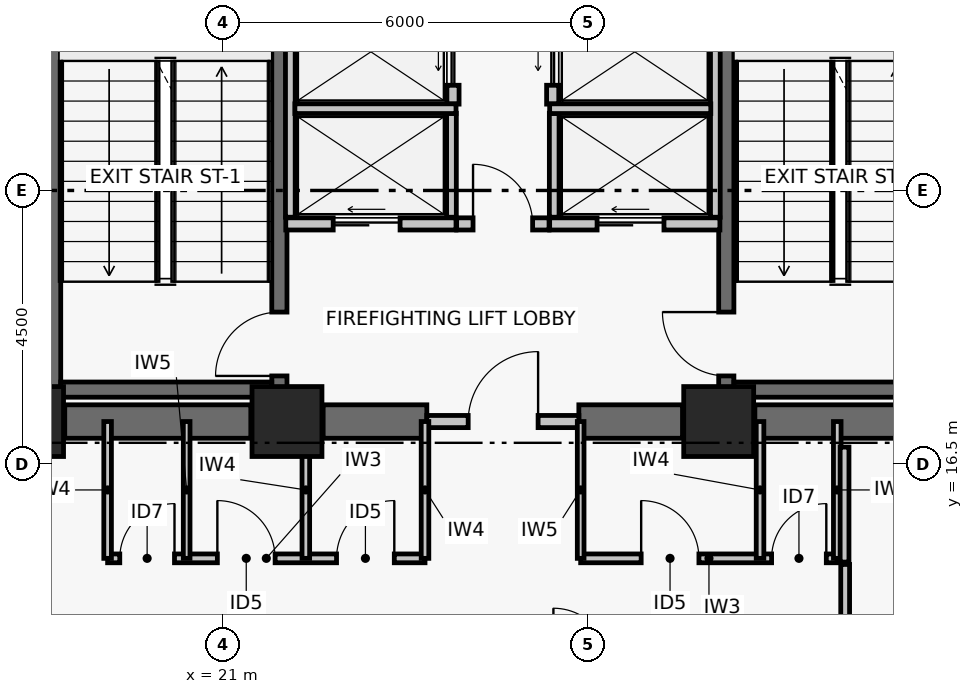
"""IFC4 building model, lengths in metres.
Left out: names, types, materials, properties, quantities, classifications, styles, units other than length and angle.
Written with IfcOpenShell. Run it as: python <this file> out.ifc"""

import sys

from ifc_helpers import new_model, si_unit, direction, frame, frame_2d, origin, origin_2d, place, context, subcontext, project, spatial, rectangle, extrude, element, fill, save


model = new_model("IFC4")
c1 = context("Model", 3, precision=1e-05, world=origin(), true_north=direction((0.0, 1.0)))
c2 = subcontext(c1, "Body", "Model", "MODEL_VIEW")
j1 = project(units=[si_unit("LENGTHUNIT", "METRE"), si_unit("PLANEANGLEUNIT", "RADIAN")], contexts=[c1])
p1 = place(None, origin())
s1 = spatial("IfcSite", under=j1, at=p1, CompositionType="ELEMENT")
p2 = place(p1, origin())
s2 = spatial("IfcBuilding", under=s1, at=p2, CompositionType="ELEMENT")
p3 = place(p2, frame((0.0, 0.0, 92.82)))
s3 = spatial("IfcBuildingStorey", under=s2, at=p3, CompositionType="ELEMENT", Elevation=92.82)
for number, where, z_axis, x_axis in (
    (1, (17.8, 17.2, 0.0), (0.0, 0.0, 1.0), (1.0, 0.0, 0.0)),
    (2, (22.05, 17.2, 0.0), (0.0, 0.0, 1.0), (1.0, 0.0, 0.0)),
    (3, (29.15, 17.2, 0.0), (0.0, 0.0, 1.0), (1.0, 0.0, 0.0)),
):
    element("IfcColumn", number, at=place(p3, frame(where, z_axis=z_axis, x_axis=x_axis)), inside=s3, PredefinedType="COLUMN", context=c2, shape_type="SweptSolid", body=[
        extrude(rectangle(XDim=1.15, YDim=1.15, at=origin_2d()), origin(), (0.0, 0.0, 1.0), 3.72),
    ])
p4 = place(p3, frame((18.395, 17.2, 0.0), z_axis=(0.0, 0.0, 1.0), x_axis=(1.0, 0.0, 0.0)))
e4 = element("IfcWall", 4, at=p4, inside=s3, PredefinedType="SHEAR", context=c2, shape_type="SweptSolid", body=[
    extrude(rectangle(XDim=3.06, YDim=0.55, at=frame_2d((1.53, 0.0))), origin(), (0.0, 0.0, 1.0), 3.47),
])
p5 = place(p3, frame((22.645, 17.2, 0.0), z_axis=(0.0, 0.0, 1.0), x_axis=(1.0, 0.0, 0.0)))
e5 = element("IfcWall", 5, at=p5, inside=s3, PredefinedType="SHEAR", context=c2, shape_type="SweptSolid", body=[
    extrude(rectangle(XDim=1.705, YDim=0.55, at=frame_2d((0.853, 0.0))), origin(), (0.0, 0.0, 1.0), 3.47),
])
p6 = place(p3, frame((26.85, 17.2, 0.0), z_axis=(0.0, 0.0, 1.0), x_axis=(1.0, 0.0, 0.0)))
e6 = element("IfcWall", 6, at=p6, inside=s3, PredefinedType="SHEAR", context=c2, shape_type="SweptSolid", body=[
    extrude(rectangle(XDim=1.705, YDim=0.55, at=frame_2d((0.853, 0.0))), origin(), (0.0, 0.0, 1.0), 3.47),
])
p7 = place(p3, frame((29.745, 17.2, 0.0), z_axis=(0.0, 0.0, 1.0), x_axis=(1.0, 0.0, 0.0)))
e7 = element("IfcWall", 7, at=p7, inside=s3, PredefinedType="SHEAR", context=c2, shape_type="SweptSolid", body=[
    extrude(rectangle(XDim=3.06, YDim=0.55, at=frame_2d((1.53, 0.0))), origin(), (0.0, 0.0, 1.0), 3.47),
])
p8 = place(p3, frame((18.204, 17.6, 0.0), z_axis=(0.0, 0.0, 1.0), x_axis=(0.0, 1.0, 0.0)))
e8 = element("IfcWall", 8, at=p8, inside=s3, PredefinedType="SHEAR", context=c2, shape_type="SweptSolid", body=[
    extrude(rectangle(XDim=8.8, YDim=0.25, at=frame_2d((4.4, 0.0))), origin(), (0.0, 0.0, 1.0), 3.47),
])
p9 = place(p3, frame((21.925, 17.6, 0.0), z_axis=(0.0, 0.0, 1.0), x_axis=(0.0, 1.0, 0.0)))
e9 = element("IfcWall", 9, at=p9, inside=s3, PredefinedType="SHEAR", context=c2, shape_type="SweptSolid", body=[
    extrude(rectangle(XDim=8.8, YDim=0.25, at=frame_2d((4.4, 0.0))), origin(), (0.0, 0.0, 1.0), 3.47),
])
p10 = place(p9, frame((0.35, 0.0, 0.0)))
e10 = element("IfcOpeningElement", 10, at=p10, cuts=e9, PredefinedType="OPENING", context=c2, shape_type="SweptSolid", body=[
    extrude(rectangle(XDim=1.05, YDim=2.08, at=frame_2d((0.525, 1.04))), frame((0.0, 0.135, 0.0), z_axis=(0.0, -1.0, 0.0), x_axis=(1.0, 0.0, 0.0)), (0.0, 0.0, 1.0), 0.27),
])
p11 = place(p3, frame((18.329, 17.725, 0.0), z_axis=(0.0, 0.0, 1.0), x_axis=(1.0, 0.0, 0.0)))
e11 = element("IfcWall", 11, at=p11, inside=s3, PredefinedType="SHEAR", context=c2, shape_type="SweptSolid", body=[
    extrude(rectangle(XDim=3.471, YDim=0.25, at=frame_2d((1.735, 0.0))), origin(), (0.0, 0.0, 1.0), 3.47),
])
p12 = place(p3, frame((29.275, 17.6, 0.0), z_axis=(0.0, 0.0, 1.0), x_axis=(0.0, 1.0, 0.0)))
e12 = element("IfcWall", 12, at=p12, inside=s3, PredefinedType="SHEAR", context=c2, shape_type="SweptSolid", body=[
    extrude(rectangle(XDim=8.8, YDim=0.25, at=frame_2d((4.4, 0.0))), origin(), (0.0, 0.0, 1.0), 3.47),
])
p13 = place(p12, frame((0.35, 0.0, 0.0)))
e13 = element("IfcOpeningElement", 13, at=p13, cuts=e12, PredefinedType="OPENING", context=c2, shape_type="SweptSolid", body=[
    extrude(rectangle(XDim=1.05, YDim=2.08, at=frame_2d((0.525, 1.04))), frame((0.0, 0.135, 0.0), z_axis=(0.0, -1.0, 0.0), x_axis=(1.0, 0.0, 0.0)), (0.0, 0.0, 1.0), 0.27),
])
p14 = place(p3, frame((29.4, 17.725, 0.0), z_axis=(0.0, 0.0, 1.0), x_axis=(1.0, 0.0, 0.0)))
e14 = element("IfcWall", 14, at=p14, inside=s3, PredefinedType="SHEAR", context=c2, shape_type="SweptSolid", body=[
    extrude(rectangle(XDim=3.471, YDim=0.25, at=frame_2d((1.736, 0.0))), origin(), (0.0, 0.0, 1.0), 3.47),
])
p15 = place(p3, frame((24.35, 17.2, 0.0), z_axis=(0.0, 0.0, 1.0), x_axis=(1.0, 0.0, 0.0)))
e15 = element("IfcWall", 15, at=p15, inside=s3, PredefinedType="PARTITIONING", context=c2, shape_type="SweptSolid", body=[
    extrude(rectangle(XDim=2.5, YDim=0.2, at=frame_2d((1.25, 0.0))), origin(), (0.0, 0.0, 1.0), 2.6),
])
p16 = place(p15, frame((0.68, 0.0, 0.0)))
e16 = element("IfcOpeningElement", 16, at=p16, cuts=e15, PredefinedType="OPENING", context=c2, shape_type="SweptSolid", body=[
    extrude(rectangle(XDim=1.15, YDim=2.08, at=frame_2d((0.575, 1.04))), frame((0.0, 0.11, 0.0), z_axis=(0.0, -1.0, 0.0), x_axis=(1.0, 0.0, 0.0)), (0.0, 0.0, 1.0), 0.22),
])
p17 = place(p3, frame((24.84, 20.45, 0.0), z_axis=(0.0, 0.0, 1.0), x_axis=(1.0, 0.0, 0.0)))
e17 = element("IfcWall", 17, at=p17, inside=s3, PredefinedType="PARTITIONING", context=c2, shape_type="SweptSolid", body=[
    extrude(rectangle(XDim=1.52, YDim=0.2, at=frame_2d((0.76, 0.0))), origin(), (0.0, 0.0, 1.0), 3.47),
])
p18 = place(p17, frame((0.27, 0.0, 0.0)))
e18 = element("IfcOpeningElement", 18, at=p18, cuts=e17, PredefinedType="OPENING", context=c2, shape_type="SweptSolid", body=[
    extrude(rectangle(XDim=0.98, YDim=2.06, at=frame_2d((0.49, 1.03))), frame((0.0, 0.11, 0.0), z_axis=(0.0, -1.0, 0.0), x_axis=(1.0, 0.0, 0.0)), (0.0, 0.0, 1.0), 0.22),
])
p19 = place(p3, frame((22.03, 20.45, 0.0), z_axis=(0.0, 0.0, 1.0), x_axis=(1.0, 0.0, 0.0)))
e19 = element("IfcWall", 19, at=p19, inside=s3, PredefinedType="PARTITIONING", context=c2, shape_type="SweptSolid", body=[
    extrude(rectangle(XDim=2.8, YDim=0.2, at=frame_2d((1.4, 0.0))), origin(), (0.0, 0.0, 1.0), 3.47),
])
p20 = place(p19, frame((0.78, 0.0, 0.0)))
e20 = element("IfcOpeningElement", 20, at=p20, cuts=e19, PredefinedType="OPENING", context=c2, shape_type="SweptSolid", body=[
    extrude(rectangle(XDim=1.1, YDim=2.08, at=frame_2d((0.55, 1.04))), frame((0.0, 0.11, 0.0), z_axis=(0.0, -1.0, 0.0), x_axis=(1.0, 0.0, 0.0)), (0.0, 0.0, 1.0), 0.22),
])
p21 = place(p3, frame((26.37, 20.45, 0.0), z_axis=(0.0, 0.0, 1.0), x_axis=(1.0, 0.0, 0.0)))
e21 = element("IfcWall", 21, at=p21, inside=s3, PredefinedType="PARTITIONING", context=c2, shape_type="SweptSolid", body=[
    extrude(rectangle(XDim=2.8, YDim=0.2, at=frame_2d((1.4, 0.0))), origin(), (0.0, 0.0, 1.0), 3.47),
])
p22 = place(p21, frame((0.78, 0.0, 0.0)))
e22 = element("IfcOpeningElement", 22, at=p22, cuts=e21, PredefinedType="OPENING", context=c2, shape_type="SweptSolid", body=[
    extrude(rectangle(XDim=1.1, YDim=2.08, at=frame_2d((0.55, 1.04))), frame((0.0, 0.11, 0.0), z_axis=(0.0, -1.0, 0.0), x_axis=(1.0, 0.0, 0.0)), (0.0, 0.0, 1.0), 0.22),
])
p23 = place(p3, frame((24.78, 22.42, 0.0), z_axis=(0.0, 0.0, 1.0), x_axis=(0.0, 1.0, 0.0)))
e23 = element("IfcWall", 23, at=p23, inside=s3, PredefinedType="PARTITIONING", context=c2, shape_type="SweptSolid", body=[
    extrude(rectangle(XDim=1.72, YDim=0.2, at=frame_2d((0.86, 0.0))), origin(), (0.0, 0.0, 1.0), 3.47),
])
p24 = place(p23, frame((0.31, 0.0, 0.0)))
e24 = element("IfcOpeningElement", 24, at=p24, cuts=e23, PredefinedType="OPENING", context=c2, shape_type="SweptSolid", body=[
    extrude(rectangle(XDim=1.1, YDim=2.08, at=frame_2d((0.55, 1.04))), frame((0.0, 0.11, 0.0), z_axis=(0.0, -1.0, 0.0), x_axis=(1.0, 0.0, 0.0)), (0.0, 0.0, 1.0), 0.22),
])
p25 = place(p3, frame((26.42, 22.42, 0.0), z_axis=(0.0, 0.0, 1.0), x_axis=(0.0, 1.0, 0.0)))
e25 = element("IfcWall", 25, at=p25, inside=s3, PredefinedType="PARTITIONING", context=c2, shape_type="SweptSolid", body=[
    extrude(rectangle(XDim=1.72, YDim=0.2, at=frame_2d((0.86, 0.0))), origin(), (0.0, 0.0, 1.0), 3.47),
])
p26 = place(p25, frame((0.31, 0.0, 0.0)))
e26 = element("IfcOpeningElement", 26, at=p26, cuts=e25, PredefinedType="OPENING", context=c2, shape_type="SweptSolid", body=[
    extrude(rectangle(XDim=1.1, YDim=2.08, at=frame_2d((0.55, 1.04))), frame((0.0, 0.11, 0.0), z_axis=(0.0, -1.0, 0.0), x_axis=(1.0, 0.0, 0.0)), (0.0, 0.0, 1.0), 0.22),
])
p27 = place(p3, frame((22.105, 20.56, 0.0), z_axis=(0.0, 0.0, 1.0), x_axis=(0.0, 1.0, 0.0)))
e27 = element("IfcWall", 27, at=p27, inside=s3, PredefinedType="PARTITIONING", context=c2, shape_type="SweptSolid", body=[
    extrude(rectangle(XDim=5.45, YDim=0.16, at=frame_2d((2.725, 0.0))), origin(), (0.0, 0.0, 1.0), 3.47),
])
p28 = place(p3, frame((24.755, 20.56, 0.0), z_axis=(0.0, 0.0, 1.0), x_axis=(0.0, 1.0, 0.0)))
e28 = element("IfcWall", 28, at=p28, inside=s3, PredefinedType="PARTITIONING", context=c2, shape_type="SweptSolid", body=[
    extrude(rectangle(XDim=1.71, YDim=0.16, at=frame_2d((0.855, 0.0))), origin(), (0.0, 0.0, 1.0), 3.47),
])
p29 = place(p3, frame((22.18, 22.345, 0.0), z_axis=(0.0, 0.0, 1.0), x_axis=(1.0, 0.0, 0.0)))
e29 = element("IfcWall", 29, at=p29, inside=s3, PredefinedType="PARTITIONING", context=c2, shape_type="SweptSolid", body=[
    extrude(rectangle(XDim=2.65, YDim=0.16, at=frame_2d((1.325, 0.0))), origin(), (0.0, 0.0, 1.0), 3.47),
])
p30 = place(p3, frame((29.095, 20.56, 0.0), z_axis=(0.0, 0.0, 1.0), x_axis=(0.0, 1.0, 0.0)))
e30 = element("IfcWall", 30, at=p30, inside=s3, PredefinedType="PARTITIONING", context=c2, shape_type="SweptSolid", body=[
    extrude(rectangle(XDim=5.45, YDim=0.16, at=frame_2d((2.725, 0.0))), origin(), (0.0, 0.0, 1.0), 3.47),
])
p31 = place(p3, frame((26.445, 20.56, 0.0), z_axis=(0.0, 0.0, 1.0), x_axis=(0.0, 1.0, 0.0)))
e31 = element("IfcWall", 31, at=p31, inside=s3, PredefinedType="PARTITIONING", context=c2, shape_type="SweptSolid", body=[
    extrude(rectangle(XDim=1.71, YDim=0.16, at=frame_2d((0.855, 0.0))), origin(), (0.0, 0.0, 1.0), 3.47),
])
p32 = place(p3, frame((26.37, 22.345, 0.0), z_axis=(0.0, 0.0, 1.0), x_axis=(1.0, 0.0, 0.0)))
e32 = element("IfcWall", 32, at=p32, inside=s3, PredefinedType="PARTITIONING", context=c2, shape_type="SweptSolid", body=[
    extrude(rectangle(XDim=2.65, YDim=0.16, at=frame_2d((1.325, 0.0))), origin(), (0.0, 0.0, 1.0), 3.47),
])
p33 = place(p3, frame((19.1, 14.95, 0.0), z_axis=(0.0, 0.0, 1.0), x_axis=(1.0, 0.0, 0.0)))
e33 = element("IfcWall", 33, at=p33, inside=s3, PredefinedType="PARTITIONING", context=c2, shape_type="SweptSolid", body=[
    extrude(rectangle(XDim=5.22, YDim=0.145, at=frame_2d((2.61, 0.0))), origin(), (0.0, 0.0, 1.0), 2.65),
])
p34 = place(p33, frame((0.2, 0.0, 0.0)))
e34 = element("IfcOpeningElement", 34, at=p34, cuts=e33, PredefinedType="OPENING", context=c2, shape_type="SweptSolid", body=[
    extrude(rectangle(XDim=0.9, YDim=2.02, at=frame_2d((0.45, 1.01))), frame((0.0, 0.083, 0.0), z_axis=(0.0, -1.0, 0.0), x_axis=(1.0, 0.0, 0.0)), (0.0, 0.0, 1.0), 0.165),
])
p35 = place(p33, frame((1.805, 0.0, 0.0)))
e35 = element("IfcOpeningElement", 35, at=p35, cuts=e33, PredefinedType="OPENING", context=c2, shape_type="SweptSolid", body=[
    extrude(rectangle(XDim=0.95, YDim=2.06, at=frame_2d((0.475, 1.03))), frame((0.0, 0.083, 0.0), z_axis=(0.0, -1.0, 0.0), x_axis=(1.0, 0.0, 0.0)), (0.0, 0.0, 1.0), 0.165),
])
p36 = place(p33, frame((3.765, 0.0, 0.0)))
e36 = element("IfcOpeningElement", 36, at=p36, cuts=e33, PredefinedType="OPENING", context=c2, shape_type="SweptSolid", body=[
    extrude(rectangle(XDim=0.95, YDim=2.06, at=frame_2d((0.475, 1.03))), frame((0.0, 0.083, 0.0), z_axis=(0.0, -1.0, 0.0), x_axis=(1.0, 0.0, 0.0)), (0.0, 0.0, 1.0), 0.165),
])
p37 = place(p3, frame((26.88, 14.95, 0.0), z_axis=(0.0, 0.0, 1.0), x_axis=(1.0, 0.0, 0.0)))
e37 = element("IfcWall", 37, at=p37, inside=s3, PredefinedType="PARTITIONING", context=c2, shape_type="SweptSolid", body=[
    extrude(rectangle(XDim=4.22, YDim=0.145, at=frame_2d((2.11, 0.0))), origin(), (0.0, 0.0, 1.0), 3.05),
])
p38 = place(p37, frame((0.995, 0.0, 0.0)))
e38 = element("IfcOpeningElement", 38, at=p38, cuts=e37, PredefinedType="OPENING", context=c2, shape_type="SweptSolid", body=[
    extrude(rectangle(XDim=0.95, YDim=2.06, at=frame_2d((0.475, 1.03))), frame((0.0, 0.083, 0.0), z_axis=(0.0, -1.0, 0.0), x_axis=(1.0, 0.0, 0.0)), (0.0, 0.0, 1.0), 0.165),
])
p39 = place(p37, frame((3.14, 0.0, 0.0)))
e39 = element("IfcOpeningElement", 39, at=p39, cuts=e37, PredefinedType="OPENING", context=c2, shape_type="SweptSolid", body=[
    extrude(rectangle(XDim=0.9, YDim=2.02, at=frame_2d((0.45, 1.01))), frame((0.0, 0.083, 0.0), z_axis=(0.0, -1.0, 0.0), x_axis=(1.0, 0.0, 0.0)), (0.0, 0.0, 1.0), 0.165),
])
p40 = place(p3, frame((19.1, 14.95, 0.0), z_axis=(0.0, 0.0, 1.0), x_axis=(0.0, 1.0, 0.0)))
e40 = element("IfcWall", 40, at=p40, inside=s3, PredefinedType="PARTITIONING", context=c2, shape_type="SweptSolid", body=[
    extrude(rectangle(XDim=2.25, YDim=0.125, at=frame_2d((1.125, 0.0))), origin(), (0.0, 0.0, 1.0), 2.6),
])
p41 = place(p3, frame((20.4, 14.95, 0.0), z_axis=(0.0, 0.0, 1.0), x_axis=(0.0, 1.0, 0.0)))
e41 = element("IfcWall", 41, at=p41, inside=s3, PredefinedType="PARTITIONING", context=c2, shape_type="SweptSolid", body=[
    extrude(rectangle(XDim=2.25, YDim=0.11, at=frame_2d((1.125, 0.0))), origin(), (0.0, 0.0, 1.0), 2.6),
])
for number, where, z_axis, x_axis in (
    (42, (22.36, 14.95, 0.0), (0.0, 0.0, 1.0), (0.0, 1.0, 0.0)),
    (43, (24.32, 14.95, 0.0), (0.0, 0.0, 1.0), (0.0, 1.0, 0.0)),
):
    element("IfcWall", number, at=place(p3, frame(where, z_axis=z_axis, x_axis=x_axis)), inside=s3, PredefinedType="PARTITIONING", context=c2, shape_type="SweptSolid", body=[
        extrude(rectangle(XDim=2.25, YDim=0.125, at=frame_2d((1.125, 0.0))), origin(), (0.0, 0.0, 1.0), 2.6),
    ])
p42 = place(p3, frame((26.88, 14.95, 0.0), z_axis=(0.0, 0.0, 1.0), x_axis=(0.0, 1.0, 0.0)))
e44 = element("IfcWall", 44, at=p42, inside=s3, PredefinedType="PARTITIONING", context=c2, shape_type="SweptSolid", body=[
    extrude(rectangle(XDim=2.25, YDim=0.11, at=frame_2d((1.125, 0.0))), origin(), (0.0, 0.0, 1.0), 2.6),
])
for number, where, z_axis, x_axis in (
    (45, (29.83, 14.95, 0.0), (0.0, 0.0, 1.0), (0.0, 1.0, 0.0)),
    (46, (31.1, 14.95, 0.0), (0.0, 0.0, 1.0), (0.0, 1.0, 0.0)),
):
    element("IfcWall", number, at=place(p3, frame(where, z_axis=z_axis, x_axis=x_axis)), inside=s3, PredefinedType="PARTITIONING", context=c2, shape_type="SweptSolid", body=[
        extrude(rectangle(XDim=2.25, YDim=0.125, at=frame_2d((1.125, 0.0))), origin(), (0.0, 0.0, 1.0), 2.6),
    ])
p43 = place(p3, frame((31.23, 13.351, 0.0), z_axis=(0.0, 0.0, 1.0), x_axis=(0.0, 1.0, 0.0)))
e47 = element("IfcWall", 47, at=p43, inside=s3, PredefinedType="PARTITIONING", context=c2, shape_type="SweptSolid", body=[
    extrude(rectangle(XDim=1.499, YDim=0.145, at=frame_2d((0.75, 0.0))), origin(), (0.0, 0.0, 1.0), 2.85),
])
p44 = place(p3, frame((31.22, 14.889, 0.0), z_axis=(0.0, 0.0, 1.0), x_axis=(0.0, 1.0, 0.0)))
e48 = element("IfcWall", 48, at=p44, inside=s3, PredefinedType="PARTITIONING", context=c2, shape_type="SweptSolid", body=[
    extrude(rectangle(XDim=1.891, YDim=0.145, at=frame_2d((0.946, 0.0))), origin(), (0.0, 0.0, 1.0), 2.6),
])
p45 = place(p10, origin())
e49 = element("IfcDoor", 49, at=p45, inside=s3, OperationType="SINGLE_SWING_LEFT", PredefinedType="DOOR", context=c2, shape_type="SweptSolid", body=[
    extrude(rectangle(XDim=1.05, YDim=2.08, at=frame_2d((0.525, 1.04))), frame((0.0, 0.025, 0.0), z_axis=(0.0, -1.0, 0.0), x_axis=(1.0, 0.0, 0.0)), (0.0, 0.0, 1.0), 0.05),
])
fill(e10, e49)
p46 = place(p13, origin())
e50 = element("IfcDoor", 50, at=p46, inside=s3, OperationType="SINGLE_SWING_RIGHT", PredefinedType="DOOR", context=c2, shape_type="SweptSolid", body=[
    extrude(rectangle(XDim=1.05, YDim=2.08, at=frame_2d((0.525, 1.04))), frame((0.0, 0.025, 0.0), z_axis=(0.0, -1.0, 0.0), x_axis=(1.0, 0.0, 0.0)), (0.0, 0.0, 1.0), 0.05),
])
fill(e13, e50)
p47 = place(p16, origin())
e51 = element("IfcDoor", 51, at=p47, inside=s3, OperationType="SINGLE_SWING_RIGHT", PredefinedType="DOOR", context=c2, shape_type="SweptSolid", body=[
    extrude(rectangle(XDim=1.15, YDim=2.08, at=frame_2d((0.575, 1.04))), frame((0.0, 0.025, 0.0), z_axis=(0.0, -1.0, 0.0), x_axis=(1.0, 0.0, 0.0)), (0.0, 0.0, 1.0), 0.05),
])
fill(e16, e51)
p48 = place(p18, origin())
e52 = element("IfcDoor", 52, at=p48, inside=s3, OperationType="SINGLE_SWING_LEFT", PredefinedType="DOOR", context=c2, shape_type="SweptSolid", body=[
    extrude(rectangle(XDim=0.98, YDim=2.06, at=frame_2d((0.49, 1.03))), frame((0.0, 0.025, 0.0), z_axis=(0.0, -1.0, 0.0), x_axis=(1.0, 0.0, 0.0)), (0.0, 0.0, 1.0), 0.05),
])
fill(e18, e52)
p49 = place(p20, origin())
e53 = element("IfcDoor", 53, at=p49, inside=s3, OperationType="DOUBLE_DOOR_SLIDING", PredefinedType="DOOR", context=c2, shape_type="SweptSolid", body=[
    extrude(rectangle(XDim=1.1, YDim=2.08, at=frame_2d((0.55, 1.04))), frame((0.0, 0.025, 0.0), z_axis=(0.0, -1.0, 0.0), x_axis=(1.0, 0.0, 0.0)), (0.0, 0.0, 1.0), 0.05),
])
fill(e20, e53)
p50 = place(p22, origin())
e54 = element("IfcDoor", 54, at=p50, inside=s3, OperationType="DOUBLE_DOOR_SLIDING", PredefinedType="DOOR", context=c2, shape_type="SweptSolid", body=[
    extrude(rectangle(XDim=1.1, YDim=2.08, at=frame_2d((0.55, 1.04))), frame((0.0, 0.025, 0.0), z_axis=(0.0, -1.0, 0.0), x_axis=(1.0, 0.0, 0.0)), (0.0, 0.0, 1.0), 0.05),
])
fill(e22, e54)
p51 = place(p24, origin())
e55 = element("IfcDoor", 55, at=p51, inside=s3, OperationType="DOUBLE_DOOR_SLIDING", PredefinedType="DOOR", context=c2, shape_type="SweptSolid", body=[
    extrude(rectangle(XDim=1.1, YDim=2.08, at=frame_2d((0.55, 1.04))), frame((0.0, 0.025, 0.0), z_axis=(0.0, -1.0, 0.0), x_axis=(1.0, 0.0, 0.0)), (0.0, 0.0, 1.0), 0.05),
])
fill(e24, e55)
p52 = place(p26, origin())
e56 = element("IfcDoor", 56, at=p52, inside=s3, OperationType="DOUBLE_DOOR_SLIDING", PredefinedType="DOOR", context=c2, shape_type="SweptSolid", body=[
    extrude(rectangle(XDim=1.1, YDim=2.08, at=frame_2d((0.55, 1.04))), frame((0.0, 0.025, 0.0), z_axis=(0.0, -1.0, 0.0), x_axis=(1.0, 0.0, 0.0)), (0.0, 0.0, 1.0), 0.05),
])
fill(e26, e56)
p53 = place(p34, origin())
e57 = element("IfcDoor", 57, at=p53, inside=s3, OperationType="SINGLE_SWING_RIGHT", PredefinedType="DOOR", context=c2, shape_type="SweptSolid", body=[
    extrude(rectangle(XDim=0.9, YDim=2.02, at=frame_2d((0.45, 1.01))), frame((0.0, 0.025, 0.0), z_axis=(0.0, -1.0, 0.0), x_axis=(1.0, 0.0, 0.0)), (0.0, 0.0, 1.0), 0.05),
])
fill(e34, e57)
p54 = place(p35, origin())
e58 = element("IfcDoor", 58, at=p54, inside=s3, OperationType="SINGLE_SWING_LEFT", PredefinedType="DOOR", context=c2, shape_type="SweptSolid", body=[
    extrude(rectangle(XDim=0.95, YDim=2.06, at=frame_2d((0.475, 1.03))), frame((0.0, 0.025, 0.0), z_axis=(0.0, -1.0, 0.0), x_axis=(1.0, 0.0, 0.0)), (0.0, 0.0, 1.0), 0.05),
])
fill(e35, e58)
p55 = place(p36, origin())
e59 = element("IfcDoor", 59, at=p55, inside=s3, OperationType="SINGLE_SWING_RIGHT", PredefinedType="DOOR", context=c2, shape_type="SweptSolid", body=[
    extrude(rectangle(XDim=0.95, YDim=2.06, at=frame_2d((0.475, 1.03))), frame((0.0, 0.025, 0.0), z_axis=(0.0, -1.0, 0.0), x_axis=(1.0, 0.0, 0.0)), (0.0, 0.0, 1.0), 0.05),
])
fill(e36, e59)
p56 = place(p38, origin())
e60 = element("IfcDoor", 60, at=p56, inside=s3, OperationType="SINGLE_SWING_LEFT", PredefinedType="DOOR", context=c2, shape_type="SweptSolid", body=[
    extrude(rectangle(XDim=0.95, YDim=2.06, at=frame_2d((0.475, 1.03))), frame((0.0, 0.025, 0.0), z_axis=(0.0, -1.0, 0.0), x_axis=(1.0, 0.0, 0.0)), (0.0, 0.0, 1.0), 0.05),
])
fill(e38, e60)
p57 = place(p39, origin())
e61 = element("IfcDoor", 61, at=p57, inside=s3, OperationType="SINGLE_SWING_RIGHT", PredefinedType="DOOR", context=c2, shape_type="SweptSolid", body=[
    extrude(rectangle(XDim=0.9, YDim=2.02, at=frame_2d((0.45, 1.01))), frame((0.0, 0.025, 0.0), z_axis=(0.0, -1.0, 0.0), x_axis=(1.0, 0.0, 0.0)), (0.0, 0.0, 1.0), 0.05),
])
fill(e39, e61)
save(model, sys.argv[1])
